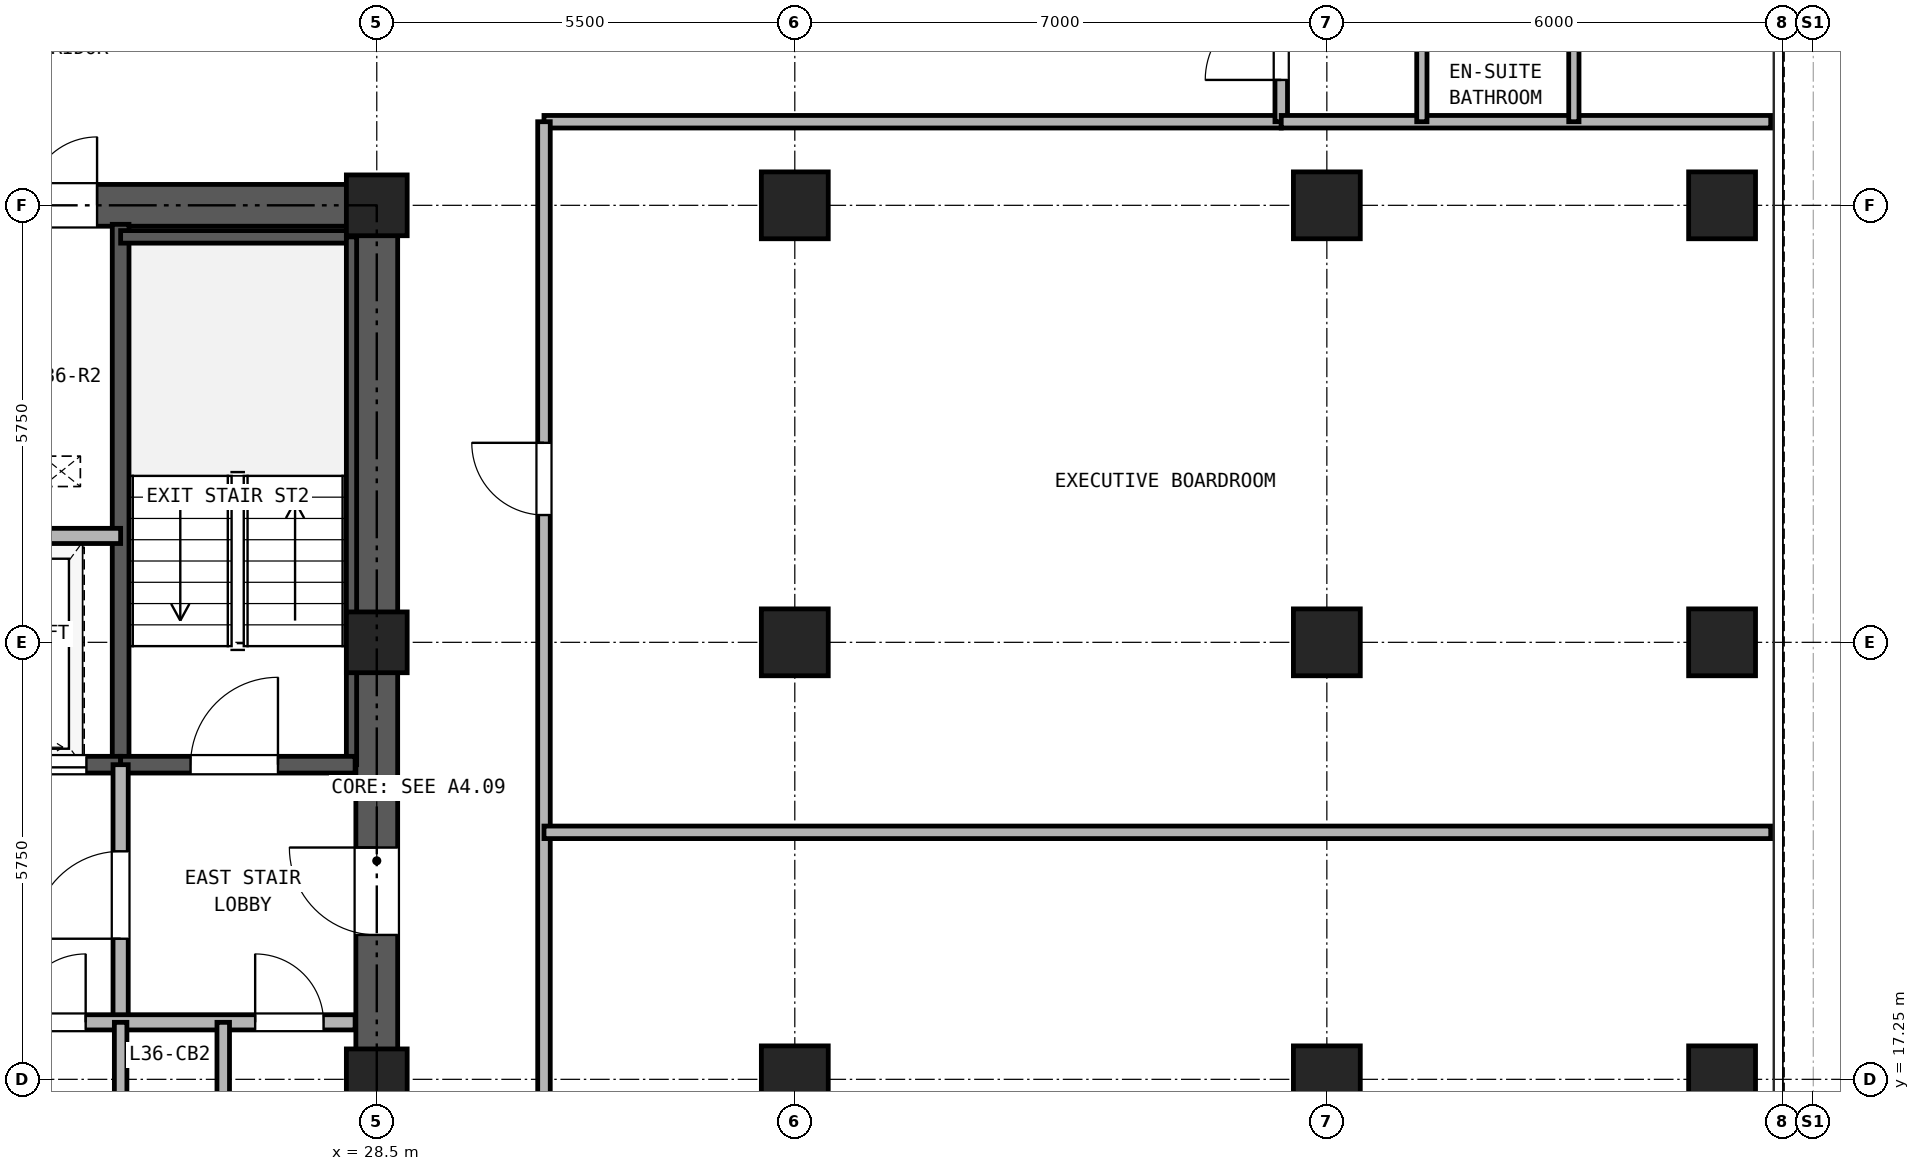
"""IFC4 building model, lengths in metres.
Left out: names, types, materials, properties, quantities, classifications, styles, units other than length and angle.
Written with IfcOpenShell. Run it as: python <this file> out.ifc"""

import sys

from ifc_helpers import new_model, si_unit, direction, frame, frame_2d, origin, origin_2d, place, context, subcontext, project, spatial, rectangle, hollow_rectangle, extrude, source, transform, mapped, element, fill, save


model = new_model("IFC4")
c1 = context("Model", 3, precision=1e-05, world=origin(), true_north=direction((0.0, 1.0)))
c2 = subcontext(c1, "Body", "Model", "MODEL_VIEW")
j1 = project(units=[si_unit("LENGTHUNIT", "METRE"), si_unit("PLANEANGLEUNIT", "RADIAN")], contexts=[c1])
p1 = place(None, origin())
s1 = spatial("IfcSite", under=j1, at=p1, CompositionType="ELEMENT")
p2 = place(p1, origin())
s2 = spatial("IfcBuilding", under=s1, at=p2, CompositionType="ELEMENT")
p3 = place(p2, frame((0.0, 0.0, 131.1)))
s3 = spatial("IfcBuildingStorey", under=s2, at=p3, CompositionType="ELEMENT", Elevation=131.1)
m1 = source(origin(), c2, "Body", "SweptSolid", [
    extrude(hollow_rectangle(XDim=0.88, YDim=0.88, WallThickness=0.05, at=origin_2d()), origin(), (0.0, 0.0, 1.0), 2.95),
])
for number, where, z_axis, x_axis in (
    (1, (46.2, 17.25, 0.0), (0.0, 0.0, 1.0), (1.0, 0.0, 0.0)),
    (2, (46.2, 23.0, 0.0), (0.0, 0.0, 1.0), (1.0, 0.0, 0.0)),
    (3, (46.2, 28.75, 0.0), (0.0, 0.0, 1.0), (1.0, 0.0, 0.0)),
):
    element("IfcColumn", number, at=place(p3, frame(where, z_axis=z_axis, x_axis=x_axis)), inside=s3, PredefinedType="COLUMN", context=c2, shape_type="MappedRepresentation", body=[
        mapped(m1, transform((0.0, 0.0, 0.0), x_axis=(1.0, 0.0, 0.0), y_axis=(0.0, 1.0, 0.0), z_axis=(0.0, 0.0, 1.0), scale=1.0)),
    ])
m2 = source(origin(), c2, "Body", "SweptSolid", [
    extrude(hollow_rectangle(XDim=0.8, YDim=0.8, WallThickness=0.045, at=origin_2d()), origin(), (0.0, 0.0, 1.0), 2.95),
])
for number, where, z_axis, x_axis in (
    (4, (28.5, 17.25, 0.0), (0.0, 0.0, 1.0), (1.0, 0.0, 0.0)),
    (5, (28.5, 23.0, 0.0), (0.0, 0.0, 1.0), (1.0, 0.0, 0.0)),
    (6, (28.5, 28.75, 0.0), (0.0, 0.0, 1.0), (1.0, 0.0, 0.0)),
):
    element("IfcColumn", number, at=place(p3, frame(where, z_axis=z_axis, x_axis=x_axis)), inside=s3, PredefinedType="COLUMN", context=c2, shape_type="MappedRepresentation", body=[
        mapped(m2, transform((0.0, 0.0, 0.0), x_axis=(1.0, 0.0, 0.0), y_axis=(0.0, 1.0, 0.0), z_axis=(0.0, 0.0, 1.0), scale=1.0)),
    ])
for number, where, z_axis, x_axis in (
    (7, (34.0, 17.25, 0.0), (0.0, 0.0, 1.0), (1.0, 0.0, 0.0)),
    (8, (34.0, 23.0, 0.0), (0.0, 0.0, 1.0), (1.0, 0.0, 0.0)),
    (9, (34.0, 28.75, 0.0), (0.0, 0.0, 1.0), (1.0, 0.0, 0.0)),
    (10, (41.0, 17.25, 0.0), (0.0, 0.0, 1.0), (1.0, 0.0, 0.0)),
    (11, (41.0, 23.0, 0.0), (0.0, 0.0, 1.0), (1.0, 0.0, 0.0)),
    (12, (41.0, 28.75, 0.0), (0.0, 0.0, 1.0), (1.0, 0.0, 0.0)),
):
    element("IfcColumn", number, at=place(p3, frame(where, z_axis=z_axis, x_axis=x_axis)), inside=s3, PredefinedType="COLUMN", context=c2, shape_type="MappedRepresentation", body=[
        mapped(m1, transform((0.0, 0.0, 0.0), x_axis=(1.0, 0.0, 0.0), y_axis=(0.0, 1.0, 0.0), z_axis=(0.0, 0.0, 1.0), scale=1.0)),
    ])
p4 = place(p3, frame((18.225, 28.75, 0.0), z_axis=(0.0, 0.0, 1.0), x_axis=(1.0, 0.0, 0.0)))
e13 = element("IfcWall", 13, at=p4, inside=s3, PredefinedType="SHEAR", context=c2, shape_type="SweptSolid", body=[
    extrude(rectangle(XDim=10.55, YDim=0.55, at=frame_2d((5.275, 0.0))), origin(), (0.0, 0.0, 1.0), 2.95),
])
p5 = place(p4, frame((4.155, 0.0, 0.0)))
e14 = element("IfcOpeningElement", 14, at=p5, cuts=e13, PredefinedType="OPENING", context=c2, shape_type="SweptSolid", body=[
    extrude(rectangle(XDim=0.9, YDim=2.05, at=frame_2d((0.45, 1.025))), frame((0.0, 0.285, 0.0), z_axis=(0.0, -1.0, 0.0), x_axis=(1.0, 0.0, 0.0)), (0.0, 0.0, 1.0), 0.57),
])
p6 = place(p4, frame((5.695, 0.0, 0.0)))
e15 = element("IfcOpeningElement", 15, at=p6, cuts=e13, PredefinedType="OPENING", context=c2, shape_type="SweptSolid", body=[
    extrude(rectangle(XDim=0.9, YDim=2.05, at=frame_2d((0.45, 1.025))), frame((0.0, 0.285, 0.0), z_axis=(0.0, -1.0, 0.0), x_axis=(1.0, 0.0, 0.0)), (0.0, 0.0, 1.0), 0.57),
])
p7 = place(p3, frame((28.5, 11.775, 0.0), z_axis=(0.0, 0.0, 1.0), x_axis=(0.0, 1.0, 0.0)))
e16 = element("IfcWall", 16, at=p7, inside=s3, PredefinedType="SHEAR", context=c2, shape_type="SweptSolid", body=[
    extrude(rectangle(XDim=16.7, YDim=0.55, at=frame_2d((8.35, 0.0))), origin(), (0.0, 0.0, 1.0), 2.95),
])
p8 = place(p7, frame((7.375, 0.0, 0.0)))
e17 = element("IfcOpeningElement", 17, at=p8, cuts=e16, PredefinedType="OPENING", context=c2, shape_type="SweptSolid", body=[
    extrude(rectangle(XDim=1.15, YDim=2.2, at=frame_2d((0.575, 1.1))), frame((0.0, 0.285, 0.0), z_axis=(0.0, -1.0, 0.0), x_axis=(1.0, 0.0, 0.0)), (0.0, 0.0, 1.0), 0.57),
])
p9 = place(p3, frame((25.13, 21.39, 0.0), z_axis=(0.0, 0.0, 1.0), x_axis=(0.0, 1.0, 0.0)))
e18 = element("IfcWall", 18, at=p9, inside=s3, PredefinedType="SOLIDWALL", context=c2, shape_type="SweptSolid", body=[
    extrude(rectangle(XDim=7.11, YDim=0.22, at=frame_2d((3.555, 0.0))), origin(), (0.0, 0.0, 1.0), 2.95),
])
p10 = place(p3, frame((25.13, 28.335, 0.0), z_axis=(0.0, 0.0, 1.0), x_axis=(1.0, 0.0, 0.0)))
e19 = element("IfcWall", 19, at=p10, inside=s3, PredefinedType="PARTITIONING", context=c2, shape_type="SweptSolid", body=[
    extrude(rectangle(XDim=3.085, YDim=0.165, at=frame_2d((1.542, 0.0))), origin(), (0.0, 0.0, 1.0), 2.95),
])
p11 = place(p3, frame((28.167, 21.39, 0.0), z_axis=(0.0, 0.0, 1.0), x_axis=(0.0, 1.0, 0.0)))
e20 = element("IfcWall", 20, at=p11, inside=s3, PredefinedType="PARTITIONING", context=c2, shape_type="SweptSolid", body=[
    extrude(rectangle(XDim=6.945, YDim=0.135, at=frame_2d((3.473, 0.0))), origin(), (0.0, 0.0, 1.0), 2.95),
])
p12 = place(p3, frame((18.785, 21.39, 0.0), z_axis=(0.0, 0.0, 1.0), x_axis=(1.0, 0.0, 0.0)))
e21 = element("IfcWall", 21, at=p12, inside=s3, PredefinedType="SOLIDWALL", context=c2, shape_type="SweptSolid", body=[
    extrude(rectangle(XDim=6.345, YDim=0.22, at=frame_2d((3.172, 0.0))), origin(), (0.0, 0.0, 1.0), 2.95),
])
p13 = place(p12, frame((1.065, 0.0, 0.0)))
e22 = element("IfcOpeningElement", 22, at=p13, cuts=e21, PredefinedType="OPENING", context=c2, shape_type="SweptSolid", body=[
    extrude(rectangle(XDim=1.15, YDim=2.2, at=frame_2d((0.575, 1.1))), frame((0.0, 0.12, 0.0), z_axis=(0.0, -1.0, 0.0), x_axis=(1.0, 0.0, 0.0)), (0.0, 0.0, 1.0), 0.24),
])
p14 = place(p12, frame((4.795, 0.0, 0.0)))
e23 = element("IfcOpeningElement", 23, at=p14, cuts=e21, PredefinedType="OPENING", context=c2, shape_type="SweptSolid", body=[
    extrude(rectangle(XDim=1.1, YDim=2.25, at=frame_2d((0.55, 1.125))), frame((0.0, 0.12, 0.0), z_axis=(0.0, -1.0, 0.0), x_axis=(1.0, 0.0, 0.0)), (0.0, 0.0, 1.0), 0.24),
])
p15 = place(p3, frame((25.13, 21.39, 0.0), z_axis=(0.0, 0.0, 1.0), x_axis=(1.0, 0.0, 0.0)))
e24 = element("IfcWall", 24, at=p15, inside=s3, PredefinedType="SOLIDWALL", context=c2, shape_type="SweptSolid", body=[
    extrude(rectangle(XDim=3.085, YDim=0.22, at=frame_2d((1.542, 0.0))), origin(), (0.0, 0.0, 1.0), 2.95),
])
p16 = place(p15, frame((0.92, 0.0, 0.0)))
e25 = element("IfcOpeningElement", 25, at=p16, cuts=e24, PredefinedType="OPENING", context=c2, shape_type="SweptSolid", body=[
    extrude(rectangle(XDim=1.15, YDim=2.2, at=frame_2d((0.575, 1.1))), frame((0.0, 0.12, 0.0), z_axis=(0.0, -1.0, 0.0), x_axis=(1.0, 0.0, 0.0)), (0.0, 0.0, 1.0), 0.24),
])
p17 = place(p3, frame((22.11, 24.4, 0.0), z_axis=(0.0, 0.0, 1.0), x_axis=(1.0, 0.0, 0.0)))
e26 = element("IfcWall", 26, at=p17, inside=s3, PredefinedType="PARTITIONING", context=c2, shape_type="SweptSolid", body=[
    extrude(rectangle(XDim=3.02, YDim=0.2, at=frame_2d((1.51, 0.0))), origin(), (0.0, 0.0, 1.0), 2.95),
])
p18 = place(p3, frame((25.13, 18.0, 0.0), z_axis=(0.0, 0.0, 1.0), x_axis=(0.0, 1.0, 0.0)))
e27 = element("IfcWall", 27, at=p18, inside=s3, PredefinedType="PARTITIONING", context=c2, shape_type="SweptSolid", body=[
    extrude(rectangle(XDim=3.39, YDim=0.2, at=frame_2d((1.695, 0.0))), origin(), (0.0, 0.0, 1.0), 2.95),
])
p19 = place(p18, frame((1.1, 0.0, 0.0)))
e28 = element("IfcOpeningElement", 28, at=p19, cuts=e27, PredefinedType="OPENING", context=c2, shape_type="SweptSolid", body=[
    extrude(rectangle(XDim=1.15, YDim=2.2, at=frame_2d((0.575, 1.1))), frame((0.0, 0.11, 0.0), z_axis=(0.0, -1.0, 0.0), x_axis=(1.0, 0.0, 0.0)), (0.0, 0.0, 1.0), 0.22),
])
p20 = place(p3, frame((18.785, 18.0, 0.0), z_axis=(0.0, 0.0, 1.0), x_axis=(1.0, 0.0, 0.0)))
e29 = element("IfcWall", 29, at=p20, inside=s3, PredefinedType="PARTITIONING", context=c2, shape_type="SweptSolid", body=[
    extrude(rectangle(XDim=9.43, YDim=0.2, at=frame_2d((4.715, 0.0))), origin(), (0.0, 0.0, 1.0), 2.95),
])
p21 = place(p20, frame((0.465, 0.0, 0.0)))
e30 = element("IfcOpeningElement", 30, at=p21, cuts=e29, PredefinedType="OPENING", context=c2, shape_type="SweptSolid", body=[
    extrude(rectangle(XDim=1.3, YDim=2.3, at=frame_2d((0.65, 1.15))), frame((0.0, 0.11, 0.0), z_axis=(0.0, -1.0, 0.0), x_axis=(1.0, 0.0, 0.0)), (0.0, 0.0, 1.0), 0.22),
])
p22 = place(p20, frame((2.565, 0.0, 0.0)))
e31 = element("IfcOpeningElement", 31, at=p22, cuts=e29, PredefinedType="OPENING", context=c2, shape_type="SweptSolid", body=[
    extrude(rectangle(XDim=1.3, YDim=2.3, at=frame_2d((0.65, 1.15))), frame((0.0, 0.11, 0.0), z_axis=(0.0, -1.0, 0.0), x_axis=(1.0, 0.0, 0.0)), (0.0, 0.0, 1.0), 0.22),
])
p23 = place(p20, frame((4.985, 0.0, 0.0)))
e32 = element("IfcOpeningElement", 32, at=p23, cuts=e29, PredefinedType="OPENING", context=c2, shape_type="SweptSolid", body=[
    extrude(rectangle(XDim=0.9, YDim=2.05, at=frame_2d((0.45, 1.025))), frame((0.0, 0.11, 0.0), z_axis=(0.0, -1.0, 0.0), x_axis=(1.0, 0.0, 0.0)), (0.0, 0.0, 1.0), 0.22),
])
p24 = place(p20, frame((8.115, 0.0, 0.0)))
e33 = element("IfcOpeningElement", 33, at=p24, cuts=e29, PredefinedType="OPENING", context=c2, shape_type="SweptSolid", body=[
    extrude(rectangle(XDim=0.9, YDim=2.05, at=frame_2d((0.45, 1.025))), frame((0.0, 0.11, 0.0), z_axis=(0.0, -1.0, 0.0), x_axis=(1.0, 0.0, 0.0)), (0.0, 0.0, 1.0), 0.22),
])
p25 = place(p3, frame((25.13, 15.0, 0.0), z_axis=(0.0, 0.0, 1.0), x_axis=(0.0, 1.0, 0.0)))
e34 = element("IfcWall", 34, at=p25, inside=s3, PredefinedType="PARTITIONING", context=c2, shape_type="SweptSolid", body=[
    extrude(rectangle(XDim=3.0, YDim=0.165, at=frame_2d((1.5, 0.0))), origin(), (0.0, 0.0, 1.0), 2.95),
])
p26 = place(p3, frame((26.48, 15.0, 0.0), z_axis=(0.0, 0.0, 1.0), x_axis=(0.0, 1.0, 0.0)))
e35 = element("IfcWall", 35, at=p26, inside=s3, PredefinedType="PARTITIONING", context=c2, shape_type="SweptSolid", body=[
    extrude(rectangle(XDim=3.0, YDim=0.165, at=frame_2d((1.5, 0.0))), origin(), (0.0, 0.0, 1.0), 2.95),
])
p27 = place(p26, frame((1.05, 0.0, 0.0)))
e36 = element("IfcOpeningElement", 36, at=p27, cuts=e35, PredefinedType="OPENING", context=c2, shape_type="SweptSolid", body=[
    extrude(rectangle(XDim=0.9, YDim=2.05, at=frame_2d((0.45, 1.025))), frame((0.0, 0.093, 0.0), z_axis=(0.0, -1.0, 0.0), x_axis=(1.0, 0.0, 0.0)), (0.0, 0.0, 1.0), 0.185),
])
p28 = place(p3, frame((30.7, 29.85, 0.0), z_axis=(0.0, 0.0, 1.0), x_axis=(1.0, 0.0, 0.0)))
e37 = element("IfcWall", 37, at=p28, inside=s3, PredefinedType="PARTITIONING", context=c2, shape_type="SweptSolid", body=[
    extrude(rectangle(XDim=9.7, YDim=0.165, at=frame_2d((4.85, 0.0))), origin(), (0.0, 0.0, 1.0), 2.95),
])
p29 = place(p3, frame((30.7, 11.15, 0.0), z_axis=(0.0, 0.0, 1.0), x_axis=(0.0, 1.0, 0.0)))
e38 = element("IfcWall", 38, at=p29, inside=s3, PredefinedType="PARTITIONING", context=c2, shape_type="SweptSolid", body=[
    extrude(rectangle(XDim=18.7, YDim=0.165, at=frame_2d((9.35, 0.0))), origin(), (0.0, 0.0, 1.0), 2.95),
])
p30 = place(p29, frame((4.175, 0.0, 0.0)))
e39 = element("IfcOpeningElement", 39, at=p30, cuts=e38, PredefinedType="OPENING", context=c2, shape_type="SweptSolid", body=[
    extrude(rectangle(XDim=0.95, YDim=2.15, at=frame_2d((0.475, 1.075))), frame((0.0, 0.093, 0.0), z_axis=(0.0, -1.0, 0.0), x_axis=(1.0, 0.0, 0.0)), (0.0, 0.0, 1.0), 0.185),
])
p31 = place(p29, frame((13.525, 0.0, 0.0)))
e40 = element("IfcOpeningElement", 40, at=p31, cuts=e38, PredefinedType="OPENING", context=c2, shape_type="SweptSolid", body=[
    extrude(rectangle(XDim=0.95, YDim=2.15, at=frame_2d((0.475, 1.075))), frame((0.0, 0.093, 0.0), z_axis=(0.0, -1.0, 0.0), x_axis=(1.0, 0.0, 0.0)), (0.0, 0.0, 1.0), 0.185),
])
p32 = place(p3, frame((40.4, 29.85, 0.0), z_axis=(0.0, 0.0, 1.0), x_axis=(0.0, 1.0, 0.0)))
e41 = element("IfcWall", 41, at=p32, inside=s3, PredefinedType="PARTITIONING", context=c2, shape_type="SweptSolid", body=[
    extrude(rectangle(XDim=5.29, YDim=0.165, at=frame_2d((2.645, 0.0))), origin(), (0.0, 0.0, 1.0), 2.95),
])
p33 = place(p32, frame((0.55, 0.0, 0.0)))
e42 = element("IfcOpeningElement", 42, at=p33, cuts=e41, PredefinedType="OPENING", context=c2, shape_type="SweptSolid", body=[
    extrude(rectangle(XDim=1.0, YDim=2.15, at=frame_2d((0.5, 1.075))), frame((0.0, 0.093, 0.0), z_axis=(0.0, -1.0, 0.0), x_axis=(1.0, 0.0, 0.0)), (0.0, 0.0, 1.0), 0.185),
])
p34 = place(p3, frame((40.4, 29.85, 0.0), z_axis=(0.0, 0.0, 1.0), x_axis=(1.0, 0.0, 0.0)))
e43 = element("IfcWall", 43, at=p34, inside=s3, PredefinedType="PARTITIONING", context=c2, shape_type="SweptSolid", body=[
    extrude(rectangle(XDim=6.44, YDim=0.165, at=frame_2d((3.22, 0.0))), origin(), (0.0, 0.0, 1.0), 2.95),
])
for number, where, z_axis, x_axis in (
    (44, (42.25, 29.85, 0.0), (0.0, 0.0, 1.0), (0.0, 1.0, 0.0)),
    (45, (44.25, 29.85, 0.0), (0.0, 0.0, 1.0), (0.0, 1.0, 0.0)),
):
    element("IfcWall", number, at=place(p3, frame(where, z_axis=z_axis, x_axis=x_axis)), inside=s3, PredefinedType="PARTITIONING", context=c2, shape_type="SweptSolid", body=[
        extrude(rectangle(XDim=2.1, YDim=0.135, at=frame_2d((1.05, 0.0))), origin(), (0.0, 0.0, 1.0), 2.95),
    ])
p35 = place(p3, frame((30.7, 20.5, 0.0), z_axis=(0.0, 0.0, 1.0), x_axis=(1.0, 0.0, 0.0)))
e46 = element("IfcWall", 46, at=p35, inside=s3, PredefinedType="PARTITIONING", context=c2, shape_type="SweptSolid", body=[
    extrude(rectangle(XDim=16.14, YDim=0.165, at=frame_2d((8.07, 0.0))), origin(), (0.0, 0.0, 1.0), 2.95),
])
p36 = place(p16, frame((1.15, 0.0, 0.0), z_axis=(0.0, 0.0, 1.0), x_axis=(-1.0, 0.0, 0.0)))
e47 = element("IfcDoor", 47, at=p36, inside=s3, OperationType="SINGLE_SWING_RIGHT", PredefinedType="DOOR", context=c2, shape_type="SweptSolid", body=[
    extrude(rectangle(XDim=1.15, YDim=2.2, at=frame_2d((0.575, 1.1))), frame((0.0, 0.025, 0.0), z_axis=(0.0, -1.0, 0.0), x_axis=(1.0, 0.0, 0.0)), (0.0, 0.0, 1.0), 0.05),
])
fill(e25, e47)
p37 = place(p14, frame((1.1, 0.0, 0.0), z_axis=(0.0, 0.0, 1.0), x_axis=(-1.0, 0.0, 0.0)))
e48 = element("IfcDoor", 48, at=p37, inside=s3, OperationType="DOUBLE_DOOR_SLIDING", PredefinedType="DOOR", context=c2, shape_type="SweptSolid", body=[
    extrude(rectangle(XDim=1.1, YDim=2.25, at=frame_2d((0.55, 1.125))), frame((0.0, 0.025, 0.0), z_axis=(0.0, -1.0, 0.0), x_axis=(1.0, 0.0, 0.0)), (0.0, 0.0, 1.0), 0.05),
])
fill(e23, e48)
p38 = place(p19, origin())
e49 = element("IfcDoor", 49, at=p38, inside=s3, OperationType="SINGLE_SWING_LEFT", PredefinedType="DOOR", context=c2, shape_type="SweptSolid", body=[
    extrude(rectangle(XDim=1.15, YDim=2.2, at=frame_2d((0.575, 1.1))), frame((0.0, 0.025, 0.0), z_axis=(0.0, -1.0, 0.0), x_axis=(1.0, 0.0, 0.0)), (0.0, 0.0, 1.0), 0.05),
])
fill(e28, e49)
p39 = place(p23, frame((0.9, 0.0, 0.0), z_axis=(0.0, 0.0, 1.0), x_axis=(-1.0, 0.0, 0.0)))
e50 = element("IfcDoor", 50, at=p39, inside=s3, OperationType="SINGLE_SWING_RIGHT", PredefinedType="DOOR", context=c2, shape_type="SweptSolid", body=[
    extrude(rectangle(XDim=0.9, YDim=2.05, at=frame_2d((0.45, 1.025))), frame((0.0, 0.025, 0.0), z_axis=(0.0, -1.0, 0.0), x_axis=(1.0, 0.0, 0.0)), (0.0, 0.0, 1.0), 0.05),
])
fill(e32, e50)
p40 = place(p24, frame((0.9, 0.0, 0.0), z_axis=(0.0, 0.0, 1.0), x_axis=(-1.0, 0.0, 0.0)))
e51 = element("IfcDoor", 51, at=p40, inside=s3, OperationType="SINGLE_SWING_LEFT", PredefinedType="DOOR", context=c2, shape_type="SweptSolid", body=[
    extrude(rectangle(XDim=0.9, YDim=2.05, at=frame_2d((0.45, 1.025))), frame((0.0, 0.025, 0.0), z_axis=(0.0, -1.0, 0.0), x_axis=(1.0, 0.0, 0.0)), (0.0, 0.0, 1.0), 0.05),
])
fill(e33, e51)
p41 = place(p8, origin())
e52 = element("IfcDoor", 52, at=p41, inside=s3, OperationType="SINGLE_SWING_RIGHT", PredefinedType="DOOR", context=c2, shape_type="SweptSolid", body=[
    extrude(rectangle(XDim=1.15, YDim=2.2, at=frame_2d((0.575, 1.1))), frame((0.0, 0.025, 0.0), z_axis=(0.0, -1.0, 0.0), x_axis=(1.0, 0.0, 0.0)), (0.0, 0.0, 1.0), 0.05),
])
fill(e17, e52)
p42 = place(p6, origin())
e53 = element("IfcDoor", 53, at=p42, inside=s3, OperationType="SINGLE_SWING_RIGHT", PredefinedType="DOOR", context=c2, shape_type="SweptSolid", body=[
    extrude(rectangle(XDim=0.9, YDim=2.05, at=frame_2d((0.45, 1.025))), frame((0.0, 0.025, 0.0), z_axis=(0.0, -1.0, 0.0), x_axis=(1.0, 0.0, 0.0)), (0.0, 0.0, 1.0), 0.05),
])
fill(e15, e53)
p43 = place(p33, frame((1.0, 0.0, 0.0), z_axis=(0.0, 0.0, 1.0), x_axis=(-1.0, 0.0, 0.0)))
e54 = element("IfcDoor", 54, at=p43, inside=s3, OperationType="SINGLE_SWING_LEFT", PredefinedType="DOOR", context=c2, shape_type="SweptSolid", body=[
    extrude(rectangle(XDim=1.0, YDim=2.15, at=frame_2d((0.5, 1.075))), frame((0.0, 0.025, 0.0), z_axis=(0.0, -1.0, 0.0), x_axis=(1.0, 0.0, 0.0)), (0.0, 0.0, 1.0), 0.05),
])
fill(e42, e54)
p44 = place(p31, origin())
e55 = element("IfcDoor", 55, at=p44, inside=s3, OperationType="SINGLE_SWING_RIGHT", PredefinedType="DOOR", context=c2, shape_type="SweptSolid", body=[
    extrude(rectangle(XDim=0.95, YDim=2.15, at=frame_2d((0.475, 1.075))), frame((0.0, 0.025, 0.0), z_axis=(0.0, -1.0, 0.0), x_axis=(1.0, 0.0, 0.0)), (0.0, 0.0, 1.0), 0.05),
])
fill(e40, e55)
save(model, sys.argv[1])
